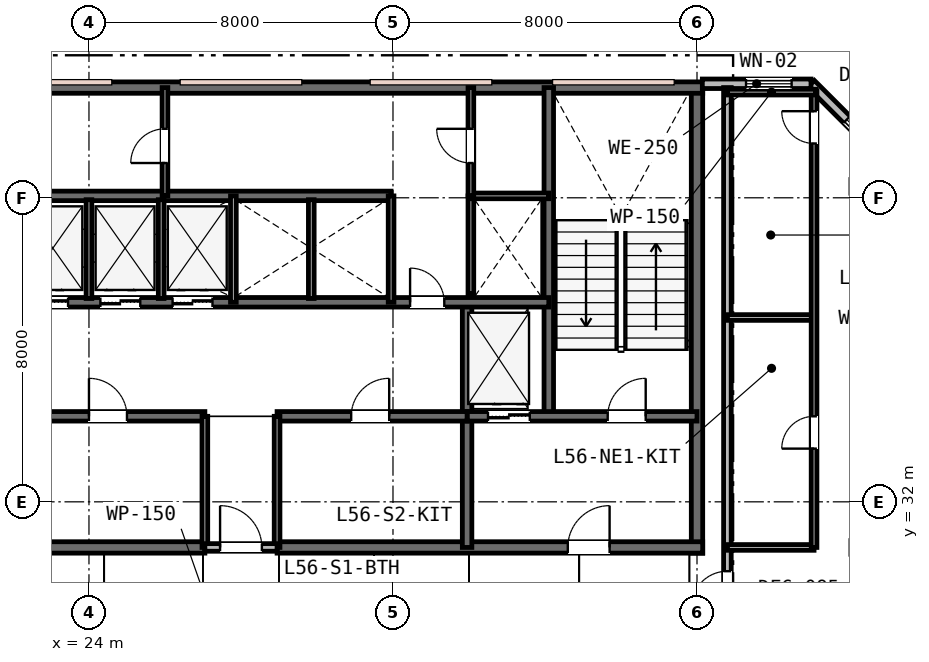
"""IFC4 building model, lengths in metres.
Left out: names, types, materials, properties, quantities, classifications, styles, units other than length and angle.
Written with IfcOpenShell. Run it as: python <this file> out.ifc"""

import sys

from ifc_helpers import new_model, si_unit, direction, frame, frame_2d, origin, place, context, subcontext, project, spatial, rectangle, extrude, element, fill, save


model = new_model("IFC4")
c1 = context("Model", 3, precision=1e-05, world=origin(), true_north=direction((0.0, 1.0)))
c2 = subcontext(c1, "Body", "Model", "MODEL_VIEW")
j1 = project(units=[si_unit("LENGTHUNIT", "METRE"), si_unit("PLANEANGLEUNIT", "RADIAN")], contexts=[c1])
p1 = place(None, origin())
s1 = spatial("IfcSite", under=j1, at=p1, CompositionType="ELEMENT")
p2 = place(p1, origin())
s2 = spatial("IfcBuilding", under=s1, at=p2, CompositionType="ELEMENT")
p3 = place(p2, frame((0.0, 0.0, 218.4)))
s3 = spatial("IfcBuildingStorey", under=s2, at=p3, CompositionType="ELEMENT", Elevation=218.4)
p4 = place(p3, frame((40.0, 30.65, 0.0), z_axis=(0.0, 0.0, 1.0), x_axis=(0.0, 1.0, 0.0)))
e1 = element("IfcWall", 1, at=p4, inside=s3, PredefinedType="SHEAR", context=c2, shape_type="SweptSolid", body=[
    extrude(rectangle(XDim=12.3, YDim=0.3, at=frame_2d((6.15, 0.0))), origin(), (0.0, 0.0, 1.0), 3.8),
])
p5 = place(p3, frame((15.85, 42.9, 0.0), z_axis=(0.0, 0.0, 1.0), x_axis=(1.0, 0.0, 0.0)))
e2 = element("IfcWall", 2, at=p5, inside=s3, PredefinedType="SHEAR", context=c2, shape_type="SweptSolid", body=[
    extrude(rectangle(XDim=24.3, YDim=0.3, at=frame_2d((12.15, 0.0))), origin(), (0.0, 0.0, 1.0), 3.8),
])
p6 = place(p3, frame((15.85, 30.8, 0.0), z_axis=(0.0, 0.0, 1.0), x_axis=(1.0, 0.0, 0.0)))
e3 = element("IfcWall", 3, at=p6, inside=s3, PredefinedType="SHEAR", context=c2, shape_type="SweptSolid", body=[
    extrude(rectangle(XDim=11.2, YDim=0.3, at=frame_2d((5.6, 0.0))), origin(), (0.0, 0.0, 1.0), 3.8),
])
p7 = place(p6, frame((2.45, 0.0, 0.0)))
e4 = element("IfcOpeningElement", 4, at=p7, cuts=e3, PredefinedType="OPENING", context=c2, shape_type="SweptSolid", body=[
    extrude(rectangle(XDim=1.1, YDim=2.15, at=frame_2d((0.55, 1.075))), frame((0.0, 0.16, 0.0), z_axis=(0.0, -1.0, 0.0), x_axis=(1.0, 0.0, 0.0)), (0.0, 0.0, 1.0), 0.32),
])
p8 = place(p3, frame((28.95, 30.8, 0.0), z_axis=(0.0, 0.0, 1.0), x_axis=(1.0, 0.0, 0.0)))
e5 = element("IfcWall", 5, at=p8, inside=s3, PredefinedType="SHEAR", context=c2, shape_type="SweptSolid", body=[
    extrude(rectangle(XDim=11.2, YDim=0.3, at=frame_2d((5.6, 0.0))), origin(), (0.0, 0.0, 1.0), 3.8),
])
p9 = place(p8, frame((7.65, 0.0, 0.0)))
e6 = element("IfcOpeningElement", 6, at=p9, cuts=e5, PredefinedType="OPENING", context=c2, shape_type="SweptSolid", body=[
    extrude(rectangle(XDim=1.1, YDim=2.15, at=frame_2d((0.55, 1.075))), frame((0.0, 0.16, 0.0), z_axis=(0.0, -1.0, 0.0), x_axis=(1.0, 0.0, 0.0)), (0.0, 0.0, 1.0), 0.32),
])
p10 = place(p3, frame((36.1, 34.25, 0.0), z_axis=(0.0, 0.0, 1.0), x_axis=(0.0, 1.0, 0.0)))
e7 = element("IfcWall", 7, at=p10, inside=s3, PredefinedType="SHEAR", context=c2, shape_type="SweptSolid", body=[
    extrude(rectangle(XDim=8.65, YDim=0.25, at=frame_2d((4.325, 0.0))), origin(), (0.0, 0.0, 1.0), 3.8),
])
p11 = place(p3, frame((33.95, 30.8, 0.0), z_axis=(0.0, 0.0, 1.0), x_axis=(0.0, 1.0, 0.0)))
e8 = element("IfcWall", 8, at=p11, inside=s3, PredefinedType="SHEAR", context=c2, shape_type="SweptSolid", body=[
    extrude(rectangle(XDim=6.45, YDim=0.25, at=frame_2d((3.225, 0.0))), origin(), (0.0, 0.0, 1.0), 3.8),
])
p12 = place(p3, frame((33.95, 34.25, 0.0), z_axis=(0.0, 0.0, 1.0), x_axis=(1.0, 0.0, 0.0)))
e9 = element("IfcWall", 9, at=p12, inside=s3, PredefinedType="SHEAR", context=c2, shape_type="SweptSolid", body=[
    extrude(rectangle(XDim=6.05, YDim=0.25, at=frame_2d((3.025, 0.0))), origin(), (0.0, 0.0, 1.0), 3.8),
])
p13 = place(p12, frame((3.7, 0.0, 0.0)))
e10 = element("IfcOpeningElement", 10, at=p13, cuts=e9, PredefinedType="OPENING", context=c2, shape_type="SweptSolid", body=[
    extrude(rectangle(XDim=1.0, YDim=2.15, at=frame_2d((0.5, 1.075))), frame((0.0, 0.135, 0.0), z_axis=(0.0, -1.0, 0.0), x_axis=(1.0, 0.0, 0.0)), (0.0, 0.0, 1.0), 0.27),
])
p14 = place(p12, frame((0.55, 0.0, 0.0)))
e11 = element("IfcOpeningElement", 11, at=p14, cuts=e9, PredefinedType="OPENING", context=c2, shape_type="SweptSolid", body=[
    extrude(rectangle(XDim=1.1, YDim=2.15, at=frame_2d((0.55, 1.075))), frame((0.0, 0.135, 0.0), z_axis=(0.0, -1.0, 0.0), x_axis=(1.0, 0.0, 0.0)), (0.0, 0.0, 1.0), 0.27),
])
p15 = place(p3, frame((22.05, 34.25, 0.0), z_axis=(0.0, 0.0, 1.0), x_axis=(1.0, 0.0, 0.0)))
e12 = element("IfcWall", 12, at=p15, inside=s3, PredefinedType="SHEAR", context=c2, shape_type="SweptSolid", body=[
    extrude(rectangle(XDim=5.0, YDim=0.25, at=frame_2d((2.5, 0.0))), origin(), (0.0, 0.0, 1.0), 3.8),
])
p16 = place(p15, frame((1.95, 0.0, 0.0)))
e13 = element("IfcOpeningElement", 13, at=p16, cuts=e12, PredefinedType="OPENING", context=c2, shape_type="SweptSolid", body=[
    extrude(rectangle(XDim=1.0, YDim=2.15, at=frame_2d((0.5, 1.075))), frame((0.0, 0.135, 0.0), z_axis=(0.0, -1.0, 0.0), x_axis=(1.0, 0.0, 0.0)), (0.0, 0.0, 1.0), 0.27),
])
p17 = place(p3, frame((28.95, 34.25, 0.0), z_axis=(0.0, 0.0, 1.0), x_axis=(1.0, 0.0, 0.0)))
e14 = element("IfcWall", 14, at=p17, inside=s3, PredefinedType="SHEAR", context=c2, shape_type="SweptSolid", body=[
    extrude(rectangle(XDim=5.0, YDim=0.25, at=frame_2d((2.5, 0.0))), origin(), (0.0, 0.0, 1.0), 3.8),
])
p18 = place(p17, frame((1.95, 0.0, 0.0)))
e15 = element("IfcOpeningElement", 15, at=p18, cuts=e14, PredefinedType="OPENING", context=c2, shape_type="SweptSolid", body=[
    extrude(rectangle(XDim=1.0, YDim=2.15, at=frame_2d((0.5, 1.075))), frame((0.0, 0.135, 0.0), z_axis=(0.0, -1.0, 0.0), x_axis=(1.0, 0.0, 0.0)), (0.0, 0.0, 1.0), 0.27),
])
p19 = place(p3, frame((19.9, 37.25, 0.0), z_axis=(0.0, 0.0, 1.0), x_axis=(1.0, 0.0, 0.0)))
e16 = element("IfcWall", 16, at=p19, inside=s3, PredefinedType="SHEAR", context=c2, shape_type="SweptSolid", body=[
    extrude(rectangle(XDim=16.2, YDim=0.25, at=frame_2d((8.1, 0.0))), origin(), (0.0, 0.0, 1.0), 3.8),
])
p20 = place(p19, frame((12.55, 0.0, 0.0)))
e17 = element("IfcOpeningElement", 17, at=p20, cuts=e16, PredefinedType="OPENING", context=c2, shape_type="SweptSolid", body=[
    extrude(rectangle(XDim=0.9, YDim=2.15, at=frame_2d((0.45, 1.075))), frame((0.0, 0.135, 0.0), z_axis=(0.0, -1.0, 0.0), x_axis=(1.0, 0.0, 0.0)), (0.0, 0.0, 1.0), 0.27),
])
p21 = place(p19, frame((2.5, 0.0, 0.0)))
e18 = element("IfcOpeningElement", 18, at=p21, cuts=e16, PredefinedType="OPENING", context=c2, shape_type="SweptSolid", body=[
    extrude(rectangle(XDim=1.05, YDim=2.15, at=frame_2d((0.525, 1.075))), frame((0.0, 0.135, 0.0), z_axis=(0.0, -1.0, 0.0), x_axis=(1.0, 0.0, 0.0)), (0.0, 0.0, 1.0), 0.27),
])
p22 = place(p19, frame((4.4, 0.0, 0.0)))
e19 = element("IfcOpeningElement", 19, at=p22, cuts=e16, PredefinedType="OPENING", context=c2, shape_type="SweptSolid", body=[
    extrude(rectangle(XDim=1.05, YDim=2.15, at=frame_2d((0.525, 1.075))), frame((0.0, 0.135, 0.0), z_axis=(0.0, -1.0, 0.0), x_axis=(1.0, 0.0, 0.0)), (0.0, 0.0, 1.0), 0.27),
])
p23 = place(p19, frame((6.3, 0.0, 0.0)))
e20 = element("IfcOpeningElement", 20, at=p23, cuts=e16, PredefinedType="OPENING", context=c2, shape_type="SweptSolid", body=[
    extrude(rectangle(XDim=1.05, YDim=2.15, at=frame_2d((0.525, 1.075))), frame((0.0, 0.135, 0.0), z_axis=(0.0, -1.0, 0.0), x_axis=(1.0, 0.0, 0.0)), (0.0, 0.0, 1.0), 0.27),
])
p24 = place(p3, frame((19.9, 40.05, 0.0), z_axis=(0.0, 0.0, 1.0), x_axis=(1.0, 0.0, 0.0)))
e21 = element("IfcWall", 21, at=p24, inside=s3, PredefinedType="SHEAR", context=c2, shape_type="SweptSolid", body=[
    extrude(rectangle(XDim=12.05, YDim=0.25, at=frame_2d((6.025, 0.0))), origin(), (0.0, 0.0, 1.0), 3.8),
])
p25 = place(p3, frame((46.0, 40.0, 0.0), z_axis=(0.0, 0.0, 1.0), x_axis=(-0.707106781187, 0.707106781187, 0.0)))
e22 = element("IfcWall", 22, at=p25, inside=s3, PredefinedType="STANDARD", context=c2, shape_type="SweptSolid", body=[
    extrude(rectangle(XDim=4.243, YDim=0.25, at=frame_2d((2.121, 0.0))), origin(), (0.0, 0.0, 1.0), 3.53),
])
p26 = place(p25, frame((1.111, 0.0, 0.75)))
e23 = element("IfcOpeningElement", 23, at=p26, cuts=e22, PredefinedType="OPENING", context=c2, shape_type="SweptSolid", body=[
    extrude(rectangle(XDim=1.8, YDim=1.85, at=frame_2d((0.9, 0.925))), frame((0.0, 0.135, 0.0), z_axis=(0.0, -1.0, 0.0), x_axis=(1.0, 0.0, 0.0)), (0.0, 0.0, 1.0), 0.27),
])
p27 = place(p3, frame((43.0, 43.0, 0.0), z_axis=(0.0, 0.0, 1.0), x_axis=(-1.0, 0.0, 0.0)))
e24 = element("IfcWall", 24, at=p27, inside=s3, PredefinedType="STANDARD", context=c2, shape_type="SweptSolid", body=[
    extrude(rectangle(XDim=2.86, YDim=0.25, at=frame_2d((1.43, 0.0))), origin(), (0.0, 0.0, 1.0), 3.53),
])
p28 = place(p27, frame((0.51, 0.0, 0.85)))
e25 = element("IfcOpeningElement", 25, at=p28, cuts=e24, PredefinedType="OPENING", context=c2, shape_type="SweptSolid", body=[
    extrude(rectangle(XDim=1.2, YDim=1.6, at=frame_2d((0.6, 0.8))), frame((0.0, 0.135, 0.0), z_axis=(0.0, -1.0, 0.0), x_axis=(1.0, 0.0, 0.0)), (0.0, 0.0, 1.0), 0.27),
])
for number, where, z_axis, x_axis in (
    (26, (27.05, 30.8, 0.0), (0.0, 0.0, 1.0), (0.0, 1.0, 0.0)),
    (27, (28.95, 30.8, 0.0), (0.0, 0.0, 1.0), (0.0, 1.0, 0.0)),
):
    element("IfcWall", number, at=place(p3, frame(where, z_axis=z_axis, x_axis=x_axis)), inside=s3, PredefinedType="PLUMBINGWALL", context=c2, shape_type="SweptSolid", body=[
        extrude(rectangle(XDim=3.45, YDim=0.15, at=frame_2d((1.725, 0.0))), origin(), (0.0, 0.0, 1.0), 3.22),
    ])
p29 = place(p3, frame((27.05, 30.8, 0.0), z_axis=(0.0, 0.0, 1.0), x_axis=(1.0, 0.0, 0.0)))
e28 = element("IfcWall", 28, at=p29, inside=s3, PredefinedType="PARTITIONING", context=c2, shape_type="SweptSolid", body=[
    extrude(rectangle(XDim=1.9, YDim=0.2, at=frame_2d((0.95, 0.0))), origin(), (0.0, 0.0, 1.0), 3.22),
])
p30 = place(p29, frame((0.4, 0.0, 0.0)))
e29 = element("IfcOpeningElement", 29, at=p30, cuts=e28, PredefinedType="OPENING", context=c2, shape_type="SweptSolid", body=[
    extrude(rectangle(XDim=1.1, YDim=2.15, at=frame_2d((0.55, 1.075))), frame((0.0, 0.11, 0.0), z_axis=(0.0, -1.0, 0.0), x_axis=(1.0, 0.0, 0.0)), (0.0, 0.0, 1.0), 0.22),
])
p31 = place(p3, frame((27.8, 37.25, 0.0), z_axis=(0.0, 0.0, 1.0), x_axis=(0.0, 1.0, 0.0)))
e30 = element("IfcWall", 30, at=p31, inside=s3, PredefinedType="PLUMBINGWALL", context=c2, shape_type="SweptSolid", body=[
    extrude(rectangle(XDim=2.8, YDim=0.15, at=frame_2d((1.4, 0.0))), origin(), (0.0, 0.0, 1.0), 3.53),
])
for number, where, z_axis, x_axis in (
    (31, (24.0, 37.35, 0.0), (0.0, 0.0, 1.0), (0.0, 1.0, 0.0)),
    (32, (25.9, 37.35, 0.0), (0.0, 0.0, 1.0), (0.0, 1.0, 0.0)),
):
    element("IfcWall", number, at=place(p3, frame(where, z_axis=z_axis, x_axis=x_axis)), inside=s3, PredefinedType="PLUMBINGWALL", context=c2, shape_type="SweptSolid", body=[
        extrude(rectangle(XDim=2.6, YDim=0.15, at=frame_2d((1.3, 0.0))), origin(), (0.0, 0.0, 1.0), 3.53),
    ])
p32 = place(p3, frame((31.95, 37.25, 0.0), z_axis=(0.0, 0.0, 1.0), x_axis=(0.0, 1.0, 0.0)))
e33 = element("IfcWall", 33, at=p32, inside=s3, PredefinedType="PLUMBINGWALL", context=c2, shape_type="SweptSolid", body=[
    extrude(rectangle(XDim=2.8, YDim=0.15, at=frame_2d((1.4, 0.0))), origin(), (0.0, 0.0, 1.0), 3.53),
])
p33 = place(p3, frame((29.85, 37.35, 0.0), z_axis=(0.0, 0.0, 1.0), x_axis=(0.0, 1.0, 0.0)))
e34 = element("IfcWall", 34, at=p33, inside=s3, PredefinedType="PLUMBINGWALL", context=c2, shape_type="SweptSolid", body=[
    extrude(rectangle(XDim=2.6, YDim=0.15, at=frame_2d((1.3, 0.0))), origin(), (0.0, 0.0, 1.0), 3.53),
])
p34 = place(p3, frame((34.05, 37.473, 0.0), z_axis=(0.0, 0.0, 1.0), x_axis=(0.0, 1.0, 0.0)))
e35 = element("IfcWall", 35, at=p34, inside=s3, PredefinedType="PLUMBINGWALL", context=c2, shape_type="SweptSolid", body=[
    extrude(rectangle(XDim=2.577, YDim=0.15, at=frame_2d((1.288, 0.0))), origin(), (0.0, 0.0, 1.0), 3.53),
])
p35 = place(p3, frame((34.05, 40.05, 0.0), z_axis=(0.0, 0.0, 1.0), x_axis=(1.0, 0.0, 0.0)))
e36 = element("IfcWall", 36, at=p35, inside=s3, PredefinedType="PARTITIONING", context=c2, shape_type="SweptSolid", body=[
    extrude(rectangle(XDim=2.05, YDim=0.15, at=frame_2d((1.025, 0.0))), origin(), (0.0, 0.0, 1.0), 3.53),
])
p36 = place(p3, frame((34.05, 40.05, 0.0), z_axis=(0.0, 0.0, 1.0), x_axis=(0.0, 1.0, 0.0)))
e37 = element("IfcWall", 37, at=p36, inside=s3, PredefinedType="PARTITIONING", context=c2, shape_type="SweptSolid", body=[
    extrude(rectangle(XDim=2.85, YDim=0.15, at=frame_2d((1.425, 0.0))), origin(), (0.0, 0.0, 1.0), 3.53),
])
p37 = place(p36, frame((0.865, 0.0, 0.0)))
e38 = element("IfcOpeningElement", 38, at=p37, cuts=e37, PredefinedType="OPENING", context=c2, shape_type="SweptSolid", body=[
    extrude(rectangle(XDim=0.9, YDim=2.15, at=frame_2d((0.45, 1.075))), frame((0.0, 0.085, 0.0), z_axis=(0.0, -1.0, 0.0), x_axis=(1.0, 0.0, 0.0)), (0.0, 0.0, 1.0), 0.17),
])
p38 = place(p3, frame((26.0, 40.05, 0.0), z_axis=(0.0, 0.0, 1.0), x_axis=(0.0, 1.0, 0.0)))
e39 = element("IfcWall", 39, at=p38, inside=s3, PredefinedType="PARTITIONING", context=c2, shape_type="SweptSolid", body=[
    extrude(rectangle(XDim=2.85, YDim=0.15, at=frame_2d((1.425, 0.0))), origin(), (0.0, 0.0, 1.0), 3.53),
])
p39 = place(p38, frame((0.865, 0.0, 0.0)))
e40 = element("IfcOpeningElement", 40, at=p39, cuts=e39, PredefinedType="OPENING", context=c2, shape_type="SweptSolid", body=[
    extrude(rectangle(XDim=0.9, YDim=2.15, at=frame_2d((0.45, 1.075))), frame((0.0, 0.085, 0.0), z_axis=(0.0, -1.0, 0.0), x_axis=(1.0, 0.0, 0.0)), (0.0, 0.0, 1.0), 0.17),
])
p40 = place(p3, frame((40.8, 28.6, 0.0), z_axis=(0.0, 0.0, 1.0), x_axis=(0.0, 1.0, 0.0)))
e41 = element("IfcWall", 41, at=p40, inside=s3, PredefinedType="PARTITIONING", context=c2, shape_type="SweptSolid", body=[
    extrude(rectangle(XDim=14.3, YDim=0.2, at=frame_2d((7.15, 0.0))), origin(), (0.0, 0.0, 1.0), 2.92),
])
p41 = place(p40, frame((0.625, 0.0, 0.0)))
e42 = element("IfcOpeningElement", 42, at=p41, cuts=e41, PredefinedType="OPENING", context=c2, shape_type="SweptSolid", body=[
    extrude(rectangle(XDim=0.95, YDim=2.15, at=frame_2d((0.475, 1.075))), frame((0.0, 0.11, 0.0), z_axis=(0.0, -1.0, 0.0), x_axis=(1.0, 0.0, 0.0)), (0.0, 0.0, 1.0), 0.22),
])
p42 = place(p3, frame((40.8, 30.8, 0.0), z_axis=(0.0, 0.0, 1.0), x_axis=(1.0, 0.0, 0.0)))
e43 = element("IfcWall", 43, at=p42, inside=s3, PredefinedType="PARTITIONING", context=c2, shape_type="SweptSolid", body=[
    extrude(rectangle(XDim=2.28, YDim=0.15, at=frame_2d((1.14, 0.0))), origin(), (0.0, 0.0, 1.0), 2.92),
])
p43 = place(p3, frame((40.8, 36.85, 0.0), z_axis=(0.0, 0.0, 1.0), x_axis=(1.0, 0.0, 0.0)))
e44 = element("IfcWall", 44, at=p43, inside=s3, PredefinedType="PARTITIONING", context=c2, shape_type="SweptSolid", body=[
    extrude(rectangle(XDim=2.28, YDim=0.15, at=frame_2d((1.14, 0.0))), origin(), (0.0, 0.0, 1.0), 3.53),
])
p44 = place(p3, frame((43.08, 30.8, 0.0), z_axis=(0.0, 0.0, 1.0), x_axis=(0.0, 1.0, 0.0)))
e45 = element("IfcWall", 45, at=p44, inside=s3, PredefinedType="PARTITIONING", context=c2, shape_type="SweptSolid", body=[
    extrude(rectangle(XDim=12.02, YDim=0.15, at=frame_2d((6.01, 0.0))), origin(), (0.0, 0.0, 1.0), 2.92),
])
p45 = place(p44, frame((2.6, 0.0, 0.0)))
e46 = element("IfcOpeningElement", 46, at=p45, cuts=e45, PredefinedType="OPENING", context=c2, shape_type="SweptSolid", body=[
    extrude(rectangle(XDim=0.85, YDim=2.15, at=frame_2d((0.425, 1.075))), frame((0.0, 0.085, 0.0), z_axis=(0.0, -1.0, 0.0), x_axis=(1.0, 0.0, 0.0)), (0.0, 0.0, 1.0), 0.17),
])
p46 = place(p44, frame((10.629, 0.0, 0.0)))
e47 = element("IfcOpeningElement", 47, at=p46, cuts=e45, PredefinedType="OPENING", context=c2, shape_type="SweptSolid", body=[
    extrude(rectangle(XDim=0.85, YDim=2.15, at=frame_2d((0.425, 1.075))), frame((0.0, 0.085, 0.0), z_axis=(0.0, -1.0, 0.0), x_axis=(1.0, 0.0, 0.0)), (0.0, 0.0, 1.0), 0.17),
])
p47 = place(p3, frame((40.8, 42.78, 0.0), z_axis=(0.0, 0.0, 1.0), x_axis=(1.0, 0.0, 0.0)))
e48 = element("IfcWall", 48, at=p47, inside=s3, PredefinedType="PARTITIONING", context=c2, shape_type="SweptSolid", body=[
    extrude(rectangle(XDim=2.32, YDim=0.15, at=frame_2d((1.16, 0.0))), origin(), (0.0, 0.0, 1.0), 3.53),
])
p48 = place(p26, origin())
e49 = element("IfcWindow", 49, at=p48, inside=s3, PartitioningType="SINGLE_PANEL", PredefinedType="WINDOW", context=c2, shape_type="SweptSolid", body=[
    extrude(rectangle(XDim=1.8, YDim=1.85, at=frame_2d((0.9, 0.925))), frame((0.0, 0.03, 0.0), z_axis=(0.0, -1.0, 0.0), x_axis=(1.0, 0.0, 0.0)), (0.0, 0.0, 1.0), 0.06),
])
fill(e23, e49)
p49 = place(p28, origin())
e50 = element("IfcWindow", 50, at=p49, inside=s3, PartitioningType="SINGLE_PANEL", PredefinedType="WINDOW", context=c2, shape_type="SweptSolid", body=[
    extrude(rectangle(XDim=1.2, YDim=1.6, at=frame_2d((0.6, 0.8))), frame((0.0, 0.03, 0.0), z_axis=(0.0, -1.0, 0.0), x_axis=(1.0, 0.0, 0.0)), (0.0, 0.0, 1.0), 0.06),
])
fill(e25, e50)
p50 = place(p30, origin())
e51 = element("IfcDoor", 51, at=p50, inside=s3, OperationType="SINGLE_SWING_LEFT", PredefinedType="DOOR", context=c2, shape_type="SweptSolid", body=[
    extrude(rectangle(XDim=1.1, YDim=2.15, at=frame_2d((0.55, 1.075))), frame((0.0, 0.025, 0.0), z_axis=(0.0, -1.0, 0.0), x_axis=(1.0, 0.0, 0.0)), (0.0, 0.0, 1.0), 0.05),
])
fill(e29, e51)
p51 = place(p13, origin())
e52 = element("IfcDoor", 52, at=p51, inside=s3, OperationType="SINGLE_SWING_RIGHT", PredefinedType="DOOR", context=c2, shape_type="SweptSolid", body=[
    extrude(rectangle(XDim=1.0, YDim=2.15, at=frame_2d((0.5, 1.075))), frame((0.0, 0.025, 0.0), z_axis=(0.0, -1.0, 0.0), x_axis=(1.0, 0.0, 0.0)), (0.0, 0.0, 1.0), 0.05),
])
fill(e10, e52)
p52 = place(p9, origin())
e53 = element("IfcDoor", 53, at=p52, inside=s3, OperationType="SINGLE_SWING_RIGHT", PredefinedType="DOOR", context=c2, shape_type="SweptSolid", body=[
    extrude(rectangle(XDim=1.1, YDim=2.15, at=frame_2d((0.55, 1.075))), frame((0.0, 0.025, 0.0), z_axis=(0.0, -1.0, 0.0), x_axis=(1.0, 0.0, 0.0)), (0.0, 0.0, 1.0), 0.05),
])
fill(e6, e53)
p53 = place(p16, origin())
e54 = element("IfcDoor", 54, at=p53, inside=s3, OperationType="SINGLE_SWING_LEFT", PredefinedType="DOOR", context=c2, shape_type="SweptSolid", body=[
    extrude(rectangle(XDim=1.0, YDim=2.15, at=frame_2d((0.5, 1.075))), frame((0.0, 0.025, 0.0), z_axis=(0.0, -1.0, 0.0), x_axis=(1.0, 0.0, 0.0)), (0.0, 0.0, 1.0), 0.05),
])
fill(e13, e54)
p54 = place(p18, origin())
e55 = element("IfcDoor", 55, at=p54, inside=s3, OperationType="SINGLE_SWING_RIGHT", PredefinedType="DOOR", context=c2, shape_type="SweptSolid", body=[
    extrude(rectangle(XDim=1.0, YDim=2.15, at=frame_2d((0.5, 1.075))), frame((0.0, 0.025, 0.0), z_axis=(0.0, -1.0, 0.0), x_axis=(1.0, 0.0, 0.0)), (0.0, 0.0, 1.0), 0.05),
])
fill(e15, e55)
p55 = place(p20, origin())
e56 = element("IfcDoor", 56, at=p55, inside=s3, OperationType="SINGLE_SWING_LEFT", PredefinedType="DOOR", context=c2, shape_type="SweptSolid", body=[
    extrude(rectangle(XDim=0.9, YDim=2.15, at=frame_2d((0.45, 1.075))), frame((0.0, 0.025, 0.0), z_axis=(0.0, -1.0, 0.0), x_axis=(1.0, 0.0, 0.0)), (0.0, 0.0, 1.0), 0.05),
])
fill(e17, e56)
p56 = place(p37, origin())
e57 = element("IfcDoor", 57, at=p56, inside=s3, OperationType="SINGLE_SWING_RIGHT", PredefinedType="DOOR", context=c2, shape_type="SweptSolid", body=[
    extrude(rectangle(XDim=0.9, YDim=2.15, at=frame_2d((0.45, 1.075))), frame((0.0, 0.025, 0.0), z_axis=(0.0, -1.0, 0.0), x_axis=(1.0, 0.0, 0.0)), (0.0, 0.0, 1.0), 0.05),
])
fill(e38, e57)
p57 = place(p39, origin())
e58 = element("IfcDoor", 58, at=p57, inside=s3, OperationType="SINGLE_SWING_LEFT", PredefinedType="DOOR", context=c2, shape_type="SweptSolid", body=[
    extrude(rectangle(XDim=0.9, YDim=2.15, at=frame_2d((0.45, 1.075))), frame((0.0, 0.025, 0.0), z_axis=(0.0, -1.0, 0.0), x_axis=(1.0, 0.0, 0.0)), (0.0, 0.0, 1.0), 0.05),
])
fill(e40, e58)
p58 = place(p41, origin())
e59 = element("IfcDoor", 59, at=p58, inside=s3, OperationType="SINGLE_SWING_LEFT", PredefinedType="DOOR", context=c2, shape_type="SweptSolid", body=[
    extrude(rectangle(XDim=0.95, YDim=2.15, at=frame_2d((0.475, 1.075))), frame((0.0, 0.025, 0.0), z_axis=(0.0, -1.0, 0.0), x_axis=(1.0, 0.0, 0.0)), (0.0, 0.0, 1.0), 0.05),
])
fill(e42, e59)
p59 = place(p45, origin())
e60 = element("IfcDoor", 60, at=p59, inside=s3, OperationType="SINGLE_SWING_LEFT", PredefinedType="DOOR", context=c2, shape_type="SweptSolid", body=[
    extrude(rectangle(XDim=0.85, YDim=2.15, at=frame_2d((0.425, 1.075))), frame((0.0, 0.025, 0.0), z_axis=(0.0, -1.0, 0.0), x_axis=(1.0, 0.0, 0.0)), (0.0, 0.0, 1.0), 0.05),
])
fill(e46, e60)
p60 = place(p46, origin())
e61 = element("IfcDoor", 61, at=p60, inside=s3, OperationType="SINGLE_SWING_RIGHT", PredefinedType="DOOR", context=c2, shape_type="SweptSolid", body=[
    extrude(rectangle(XDim=0.85, YDim=2.15, at=frame_2d((0.425, 1.075))), frame((0.0, 0.025, 0.0), z_axis=(0.0, -1.0, 0.0), x_axis=(1.0, 0.0, 0.0)), (0.0, 0.0, 1.0), 0.05),
])
fill(e47, e61)
p61 = place(p14, origin())
e62 = element("IfcDoor", 62, at=p61, inside=s3, OperationType="DOUBLE_DOOR_SLIDING", PredefinedType="DOOR", context=c2, shape_type="SweptSolid", body=[
    extrude(rectangle(XDim=1.1, YDim=2.15, at=frame_2d((0.55, 1.075))), frame((0.0, 0.025, 0.0), z_axis=(0.0, -1.0, 0.0), x_axis=(1.0, 0.0, 0.0)), (0.0, 0.0, 1.0), 0.05),
])
fill(e11, e62)
p62 = place(p21, origin())
e63 = element("IfcDoor", 63, at=p62, inside=s3, OperationType="DOUBLE_DOOR_SLIDING", PredefinedType="DOOR", context=c2, shape_type="SweptSolid", body=[
    extrude(rectangle(XDim=1.05, YDim=2.15, at=frame_2d((0.525, 1.075))), frame((0.0, 0.025, 0.0), z_axis=(0.0, -1.0, 0.0), x_axis=(1.0, 0.0, 0.0)), (0.0, 0.0, 1.0), 0.05),
])
fill(e18, e63)
p63 = place(p22, origin())
e64 = element("IfcDoor", 64, at=p63, inside=s3, OperationType="DOUBLE_DOOR_SLIDING", PredefinedType="DOOR", context=c2, shape_type="SweptSolid", body=[
    extrude(rectangle(XDim=1.05, YDim=2.15, at=frame_2d((0.525, 1.075))), frame((0.0, 0.025, 0.0), z_axis=(0.0, -1.0, 0.0), x_axis=(1.0, 0.0, 0.0)), (0.0, 0.0, 1.0), 0.05),
])
fill(e19, e64)
p64 = place(p23, origin())
e65 = element("IfcDoor", 65, at=p64, inside=s3, OperationType="DOUBLE_DOOR_SLIDING", PredefinedType="DOOR", context=c2, shape_type="SweptSolid", body=[
    extrude(rectangle(XDim=1.05, YDim=2.15, at=frame_2d((0.525, 1.075))), frame((0.0, 0.025, 0.0), z_axis=(0.0, -1.0, 0.0), x_axis=(1.0, 0.0, 0.0)), (0.0, 0.0, 1.0), 0.05),
])
fill(e20, e65)
save(model, sys.argv[1])
